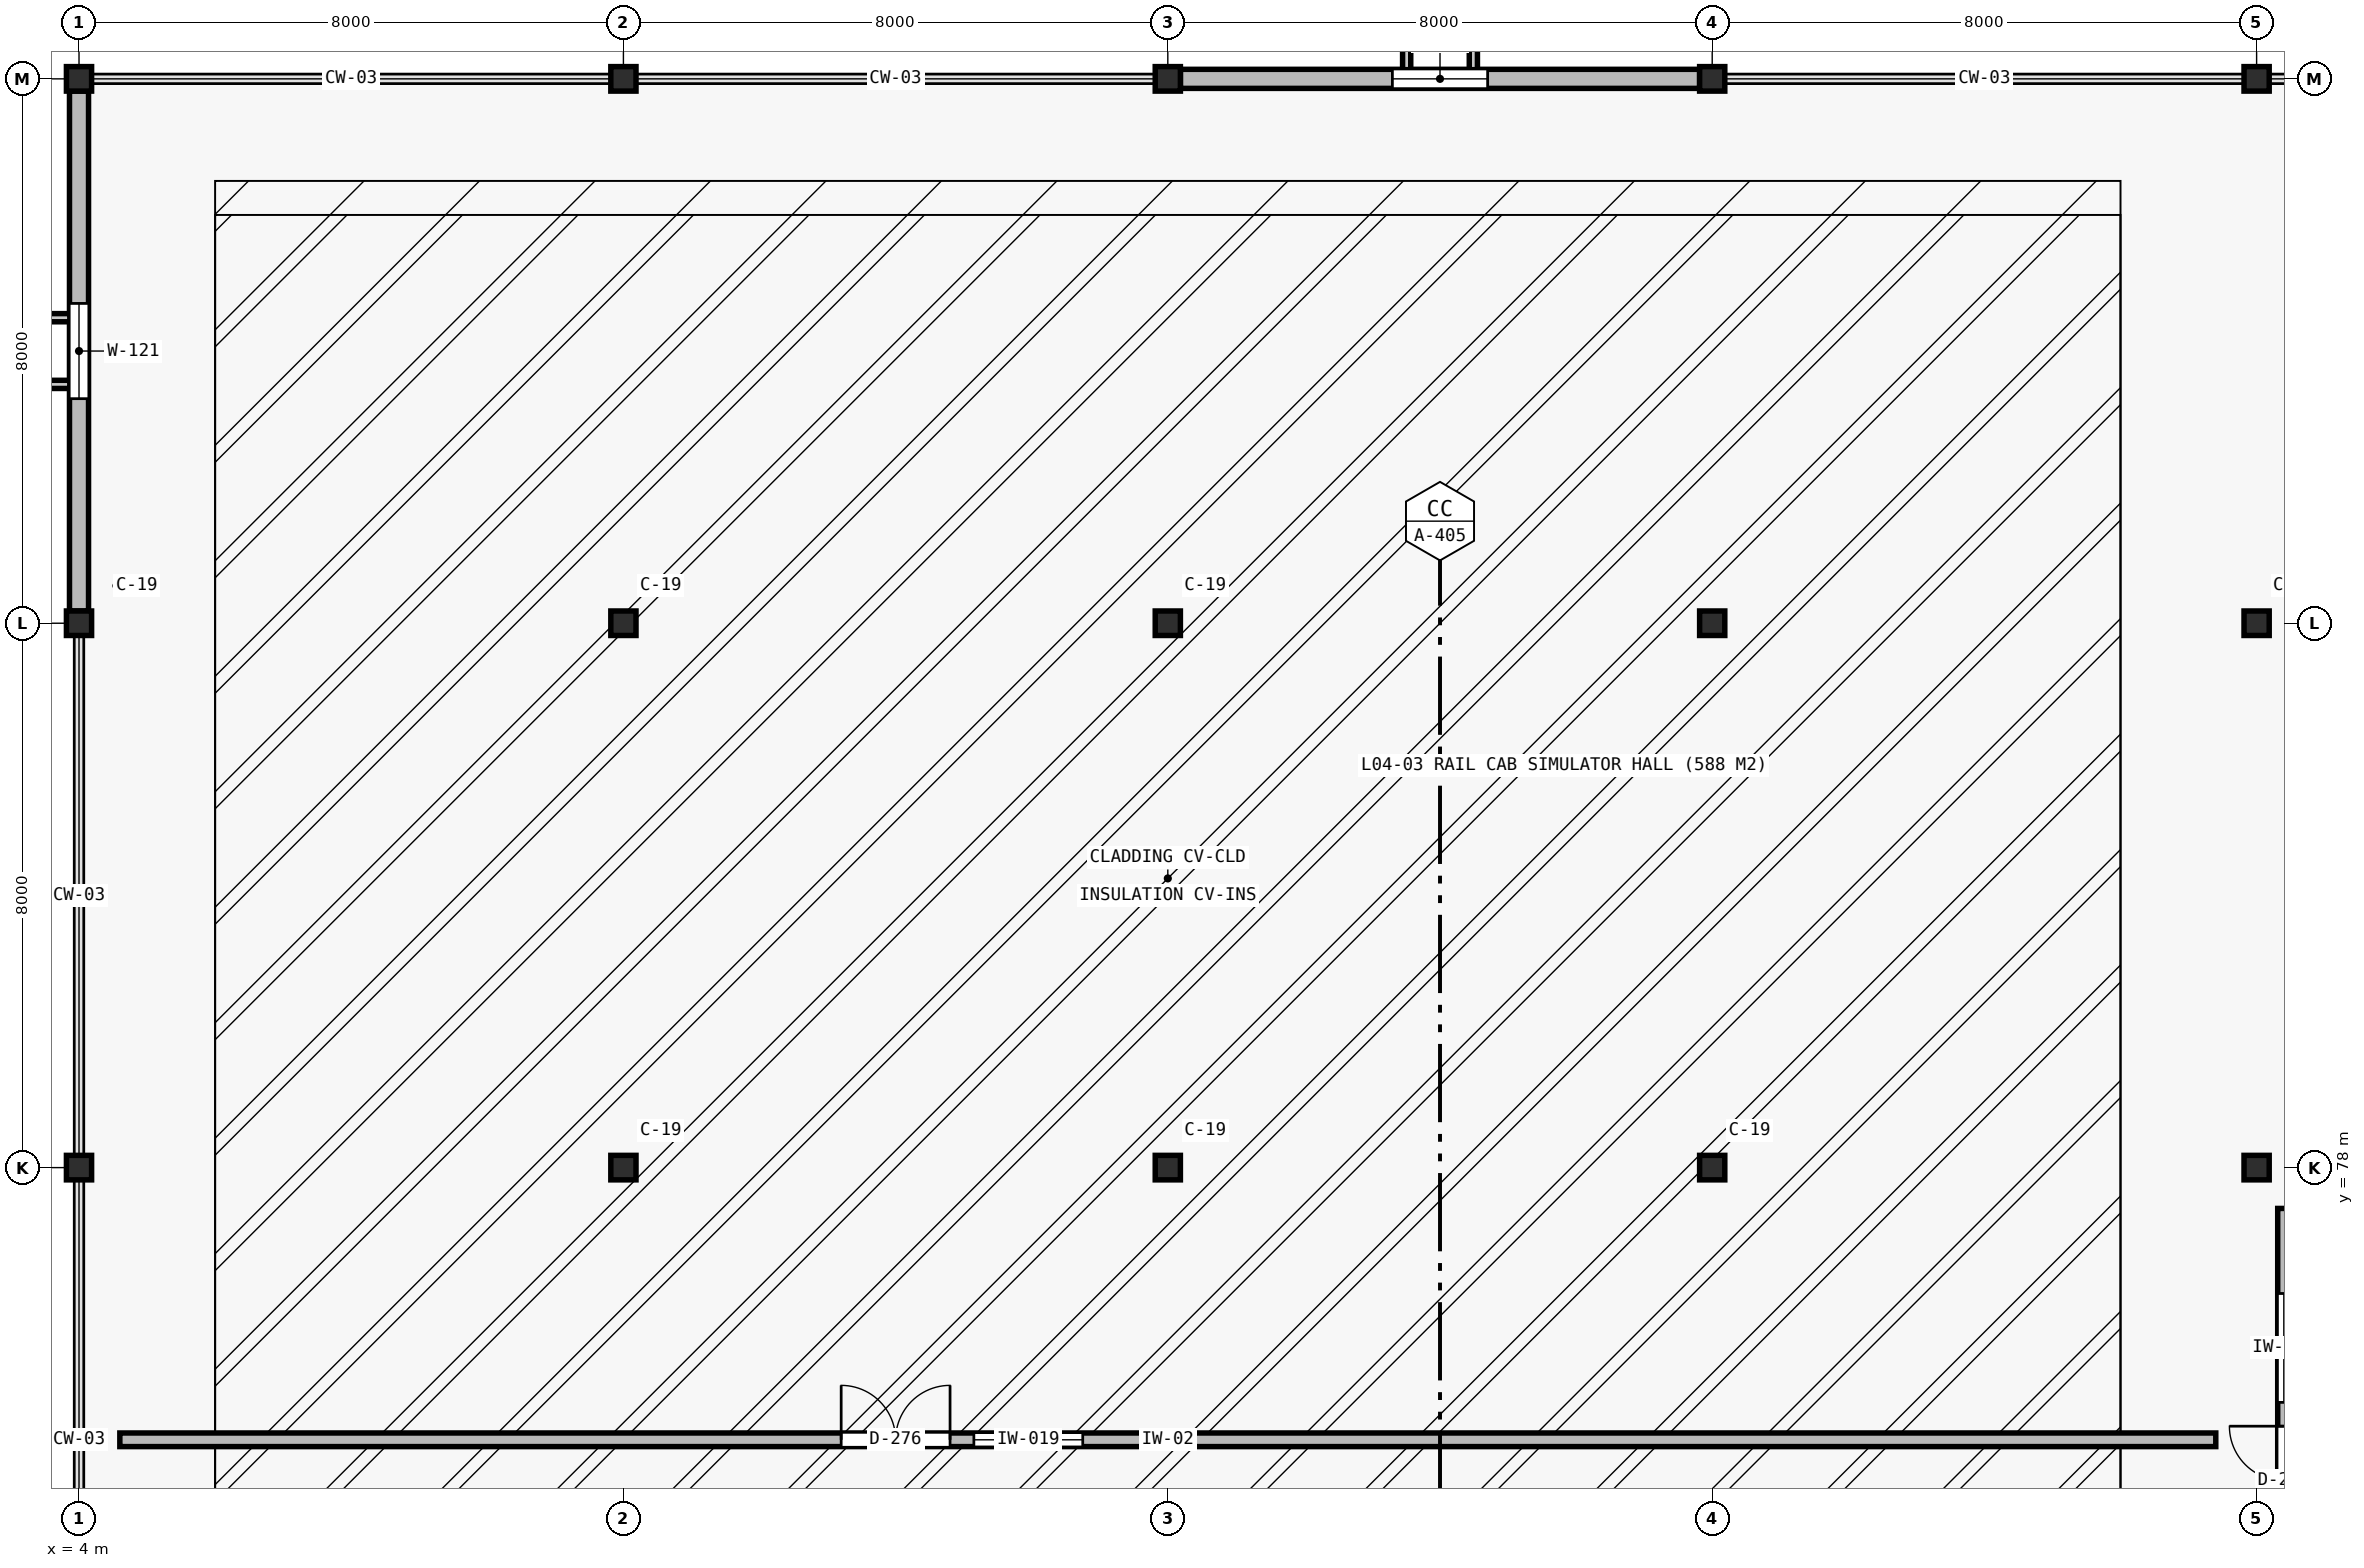
"""IFC4 building model, lengths in metres.
Left out: names, types, materials, properties, quantities, classifications, styles, units other than length and angle.
Written with IfcOpenShell. Run it as: python <this file> out.ifc"""

import sys

from ifc_helpers import new_model, si_unit, direction, frame, frame_2d, origin, origin_2d, place, context, subcontext, project, spatial, rectangle, i_section, extrude, element, fill, save


model = new_model("IFC4")
c1 = context("Model", 3, precision=1e-05, world=origin(), true_north=direction((0.0, 1.0)))
c2 = subcontext(c1, "Body", "Model", "MODEL_VIEW")
j1 = project(units=[si_unit("LENGTHUNIT", "METRE"), si_unit("PLANEANGLEUNIT", "RADIAN")], contexts=[c1])
p1 = place(None, origin())
s1 = spatial("IfcSite", under=j1, at=p1, CompositionType="ELEMENT")
p2 = place(p1, origin())
s2 = spatial("IfcBuilding", under=s1, at=p2, CompositionType="ELEMENT")
p3 = place(p2, frame((0.0, 0.0, 19.6)))
s3 = spatial("IfcBuildingStorey", under=s2, at=p3, CompositionType="ELEMENT", Elevation=19.6)
for number, where, z_axis, x_axis in (
    (1, (4.0, 78.0, 0.0), (0.0, 0.0, 1.0), (1.0, 0.0, 0.0)),
    (2, (4.0, 86.0, 0.0), (0.0, 0.0, 1.0), (1.0, 0.0, 0.0)),
    (3, (4.0, 94.0, 0.0), (0.0, 0.0, 1.0), (1.0, 0.0, 0.0)),
    (4, (12.0, 78.0, 0.0), (0.0, 0.0, 1.0), (1.0, 0.0, 0.0)),
    (5, (12.0, 86.0, 0.0), (0.0, 0.0, 1.0), (1.0, 0.0, 0.0)),
    (6, (12.0, 94.0, 0.0), (0.0, 0.0, 1.0), (1.0, 0.0, 0.0)),
    (7, (20.0, 78.0, 0.0), (0.0, 0.0, 1.0), (1.0, 0.0, 0.0)),
    (8, (20.0, 86.0, 0.0), (0.0, 0.0, 1.0), (1.0, 0.0, 0.0)),
    (9, (20.0, 94.0, 0.0), (0.0, 0.0, 1.0), (1.0, 0.0, 0.0)),
    (10, (28.0, 78.0, 0.0), (0.0, 0.0, 1.0), (1.0, 0.0, 0.0)),
    (11, (28.0, 86.0, 0.0), (0.0, 0.0, 1.0), (1.0, 0.0, 0.0)),
    (12, (28.0, 94.0, 0.0), (0.0, 0.0, 1.0), (1.0, 0.0, 0.0)),
    (13, (36.0, 78.0, 0.0), (0.0, 0.0, 1.0), (1.0, 0.0, 0.0)),
    (14, (36.0, 86.0, 0.0), (0.0, 0.0, 1.0), (1.0, 0.0, 0.0)),
    (15, (36.0, 94.0, 0.0), (0.0, 0.0, 1.0), (1.0, 0.0, 0.0)),
):
    element("IfcColumn", number, at=place(p3, frame(where, z_axis=z_axis, x_axis=x_axis)), inside=s3, PredefinedType="COLUMN", context=c2, shape_type="SweptSolid", body=[
        extrude(i_section(OverallWidth=0.37, OverallDepth=0.36, WebThickness=0.012, FlangeThickness=0.02, at=origin_2d()), origin(), (0.0, 0.0, 1.0), 4.02),
    ])
p4 = place(p3, frame((4.0, 86.18, 0.0), z_axis=(0.0, 0.0, 1.0), x_axis=(0.0, 1.0, 0.0)))
e16 = element("IfcWall", 16, at=p4, inside=s3, PredefinedType="STANDARD", context=c2, shape_type="SweptSolid", body=[
    extrude(rectangle(XDim=7.64, YDim=0.28, at=frame_2d((3.82, 0.0))), origin(), (0.0, 0.0, 1.0), 3.56),
])
p5 = place(p4, frame((3.12, 0.0, 0.95)))
e17 = element("IfcOpeningElement", 17, at=p5, cuts=e16, PredefinedType="OPENING", context=c2, shape_type="SweptSolid", body=[
    extrude(rectangle(XDim=1.4, YDim=1.75, at=frame_2d((0.7, 0.875))), frame((0.0, 0.15, 0.0), z_axis=(0.0, -1.0, 0.0), x_axis=(1.0, 0.0, 0.0)), (0.0, 0.0, 1.0), 0.3),
])
p6 = place(p3, frame((20.185, 94.0, 0.0), z_axis=(0.0, 0.0, 1.0), x_axis=(1.0, 0.0, 0.0)))
e18 = element("IfcWall", 18, at=p6, inside=s3, PredefinedType="STANDARD", context=c2, shape_type="SweptSolid", body=[
    extrude(rectangle(XDim=7.63, YDim=0.28, at=frame_2d((3.815, 0.0))), origin(), (0.0, 0.0, 1.0), 3.61),
])
p7 = place(p6, frame((3.115, 0.0, 0.95)))
e19 = element("IfcOpeningElement", 19, at=p7, cuts=e18, PredefinedType="OPENING", context=c2, shape_type="SweptSolid", body=[
    extrude(rectangle(XDim=1.4, YDim=1.75, at=frame_2d((0.7, 0.875))), frame((0.0, 0.15, 0.0), z_axis=(0.0, -1.0, 0.0), x_axis=(1.0, 0.0, 0.0)), (0.0, 0.0, 1.0), 0.3),
])
p8 = place(p3, frame((4.6, 74.0, 0.0), z_axis=(0.0, 0.0, 1.0), x_axis=(1.0, 0.0, 0.0)))
e20 = element("IfcWall", 20, at=p8, inside=s3, PredefinedType="PARTITIONING", context=c2, shape_type="SweptSolid", body=[
    extrude(rectangle(XDim=30.8, YDim=0.2, at=frame_2d((15.4, 0.0))), origin(), (0.0, 0.0, 1.0), 4.02),
])
p9 = place(p8, frame((10.6, 0.0, 0.0)))
e21 = element("IfcOpeningElement", 21, at=p9, cuts=e20, PredefinedType="OPENING", context=c2, shape_type="SweptSolid", body=[
    extrude(rectangle(XDim=1.6, YDim=2.2, at=frame_2d((0.8, 1.1))), frame((0.0, 0.11, 0.0), z_axis=(0.0, -1.0, 0.0), x_axis=(1.0, 0.0, 0.0)), (0.0, 0.0, 1.0), 0.22),
])
p10 = place(p8, frame((12.55, 0.0, 0.95)))
e22 = element("IfcOpeningElement", 22, at=p10, cuts=e20, PredefinedType="OPENING", context=c2, shape_type="SweptSolid", body=[
    extrude(rectangle(XDim=1.6, YDim=1.3, at=frame_2d((0.8, 0.65))), frame((0.0, 0.11, 0.0), z_axis=(0.0, -1.0, 0.0), x_axis=(1.0, 0.0, 0.0)), (0.0, 0.0, 1.0), 0.22),
])
p11 = place(p3, frame((36.4, 70.2, 0.0), z_axis=(0.0, 0.0, 1.0), x_axis=(0.0, 1.0, 0.0)))
e23 = element("IfcWall", 23, at=p11, inside=s3, PredefinedType="PARTITIONING", context=c2, shape_type="SweptSolid", body=[
    extrude(rectangle(XDim=7.2, YDim=0.18, at=frame_2d((3.6, 0.0))), origin(), (0.0, 0.0, 1.0), 4.02),
])
p12 = place(p11, frame((2.4, 0.0, 0.0)))
e24 = element("IfcOpeningElement", 24, at=p12, cuts=e23, PredefinedType="OPENING", context=c2, shape_type="SweptSolid", body=[
    extrude(rectangle(XDim=1.6, YDim=2.2, at=frame_2d((0.8, 1.1))), frame((0.0, 0.1, 0.0), z_axis=(0.0, -1.0, 0.0), x_axis=(1.0, 0.0, 0.0)), (0.0, 0.0, 1.0), 0.2),
])
p13 = place(p11, frame((4.35, 0.0, 0.95)))
e25 = element("IfcOpeningElement", 25, at=p13, cuts=e23, PredefinedType="OPENING", context=c2, shape_type="SweptSolid", body=[
    extrude(rectangle(XDim=1.6, YDim=1.3, at=frame_2d((0.8, 0.65))), frame((0.0, 0.1, 0.0), z_axis=(0.0, -1.0, 0.0), x_axis=(1.0, 0.0, 0.0)), (0.0, 0.0, 1.0), 0.2),
])
p14 = place(p5, origin())
e26 = element("IfcWindow", 26, at=p14, inside=s3, PartitioningType="SINGLE_PANEL", PredefinedType="WINDOW", context=c2, shape_type="SweptSolid", body=[
    extrude(rectangle(XDim=1.4, YDim=1.75, at=frame_2d((0.7, 0.875))), frame((0.0, 0.03, 0.0), z_axis=(0.0, -1.0, 0.0), x_axis=(1.0, 0.0, 0.0)), (0.0, 0.0, 1.0), 0.06),
])
fill(e17, e26)
p15 = place(p7, origin())
e27 = element("IfcWindow", 27, at=p15, inside=s3, PartitioningType="SINGLE_PANEL", PredefinedType="WINDOW", context=c2, shape_type="SweptSolid", body=[
    extrude(rectangle(XDim=1.4, YDim=1.75, at=frame_2d((0.7, 0.875))), frame((0.0, 0.03, 0.0), z_axis=(0.0, -1.0, 0.0), x_axis=(1.0, 0.0, 0.0)), (0.0, 0.0, 1.0), 0.06),
])
fill(e19, e27)
p16 = place(p9, origin())
e28 = element("IfcDoor", 28, at=p16, inside=s3, OperationType="DOUBLE_DOOR_SINGLE_SWING", PredefinedType="DOOR", context=c2, shape_type="SweptSolid", body=[
    extrude(rectangle(XDim=1.6, YDim=2.2, at=frame_2d((0.8, 1.1))), frame((0.0, 0.025, 0.0), z_axis=(0.0, -1.0, 0.0), x_axis=(1.0, 0.0, 0.0)), (0.0, 0.0, 1.0), 0.05),
])
fill(e21, e28)
p17 = place(p10, origin())
e29 = element("IfcWindow", 29, at=p17, inside=s3, PartitioningType="SINGLE_PANEL", PredefinedType="WINDOW", context=c2, shape_type="SweptSolid", body=[
    extrude(rectangle(XDim=1.6, YDim=1.3, at=frame_2d((0.8, 0.65))), frame((0.0, 0.03, 0.0), z_axis=(0.0, -1.0, 0.0), x_axis=(1.0, 0.0, 0.0)), (0.0, 0.0, 1.0), 0.06),
])
fill(e22, e29)
p18 = place(p12, origin())
e30 = element("IfcDoor", 30, at=p18, inside=s3, OperationType="DOUBLE_DOOR_SINGLE_SWING", PredefinedType="DOOR", context=c2, shape_type="SweptSolid", body=[
    extrude(rectangle(XDim=1.6, YDim=2.2, at=frame_2d((0.8, 1.1))), frame((0.0, 0.025, 0.0), z_axis=(0.0, -1.0, 0.0), x_axis=(1.0, 0.0, 0.0)), (0.0, 0.0, 1.0), 0.05),
])
fill(e24, e30)
p19 = place(p13, origin())
e31 = element("IfcWindow", 31, at=p19, inside=s3, PartitioningType="SINGLE_PANEL", PredefinedType="WINDOW", context=c2, shape_type="SweptSolid", body=[
    extrude(rectangle(XDim=1.6, YDim=1.3, at=frame_2d((0.8, 0.65))), frame((0.0, 0.03, 0.0), z_axis=(0.0, -1.0, 0.0), x_axis=(1.0, 0.0, 0.0)), (0.0, 0.0, 1.0), 0.06),
])
fill(e25, e31)
save(model, sys.argv[1])
